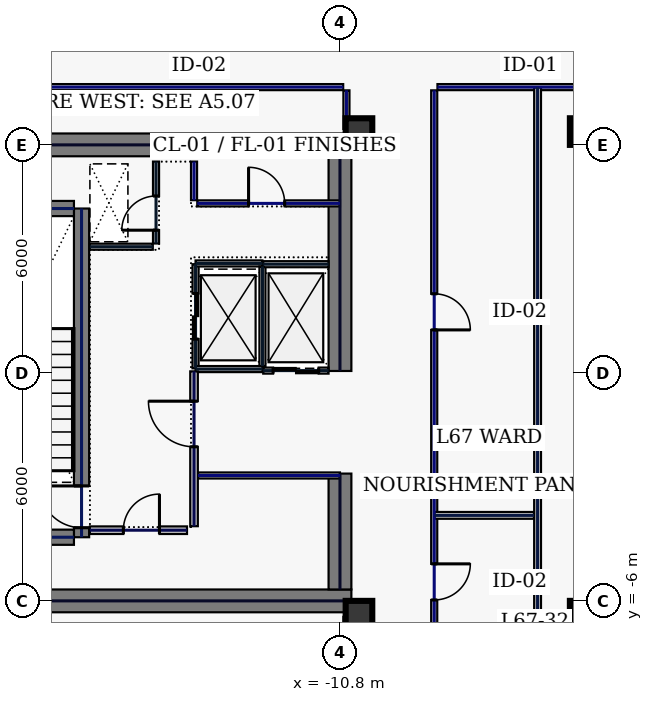
"""IFC4 building model, lengths in metres.
Left out: names, types, materials, properties, quantities, classifications, styles, units other than length and angle.
Written with IfcOpenShell. Run it as: python <this file> out.ifc"""

import sys

from ifc_helpers import new_model, si_unit, direction, frame, frame_2d, origin, origin_2d, place, context, subcontext, project, spatial, rectangle, hollow_rectangle, extrude, element, fill, save


model = new_model("IFC4")
c1 = context("Model", 3, precision=1e-05, world=origin(), true_north=direction((0.0, 1.0)))
c2 = subcontext(c1, "Body", "Model", "MODEL_VIEW")
j1 = project(units=[si_unit("LENGTHUNIT", "METRE"), si_unit("PLANEANGLEUNIT", "RADIAN")], contexts=[c1])
p1 = place(None, origin())
s1 = spatial("IfcSite", under=j1, at=p1, CompositionType="ELEMENT")
p2 = place(p1, origin())
s2 = spatial("IfcBuilding", under=s1, at=p2, CompositionType="ELEMENT")
p3 = place(p2, frame((0.0, 0.0, 289.0)))
s3 = spatial("IfcBuildingStorey", under=s2, at=p3, CompositionType="ELEMENT", Elevation=289.0)
for number, where, z_axis, x_axis in (
    (1, (-22.0, 6.0, 0.0), (0.0, 0.0, 1.0), (1.0, 0.0, 0.0)),
    (2, (-22.0, -6.0, 0.0), (0.0, 0.0, 1.0), (1.0, 0.0, 0.0)),
):
    element("IfcWall", number, at=place(p3, frame(where, z_axis=z_axis, x_axis=x_axis)), inside=s3, PredefinedType="SHEAR", context=c2, shape_type="SweptSolid", body=[
        extrude(rectangle(XDim=11.5, YDim=0.6, at=frame_2d((5.75, 0.0))), origin(), (0.0, 0.0, 1.0), 3.74),
    ])
p4 = place(p3, frame((-10.8, -5.7, 0.0), z_axis=(0.0, 0.0, 1.0), x_axis=(0.0, 1.0, 0.0)))
e3 = element("IfcWall", 3, at=p4, inside=s3, PredefinedType="SHEAR", context=c2, shape_type="SweptSolid", body=[
    extrude(rectangle(XDim=3.05, YDim=0.6, at=frame_2d((1.525, 0.0))), origin(), (0.0, 0.0, 1.0), 3.74),
])
p5 = place(p3, frame((-10.8, 0.05, 0.0), z_axis=(0.0, 0.0, 1.0), x_axis=(0.0, 1.0, 0.0)))
e4 = element("IfcWall", 4, at=p5, inside=s3, PredefinedType="SHEAR", context=c2, shape_type="SweptSolid", body=[
    extrude(rectangle(XDim=5.65, YDim=0.6, at=frame_2d((2.825, 0.0))), origin(), (0.0, 0.0, 1.0), 3.74),
])
p6 = place(p3, frame((-17.6, -4.325, 0.0), z_axis=(0.0, 0.0, 1.0), x_axis=(0.0, 1.0, 0.0)))
e5 = element("IfcWall", 5, at=p6, inside=s3, PredefinedType="SHEAR", context=c2, shape_type="SweptSolid", body=[
    extrude(rectangle(XDim=8.65, YDim=0.4, at=frame_2d((4.325, 0.0))), origin(), (0.0, 0.0, 1.0), 3.74),
])
p7 = place(p6, frame((0.25, 0.0, 0.0)))
e6 = element("IfcOpeningElement", 6, at=p7, cuts=e5, PredefinedType="OPENING", context=c2, shape_type="SweptSolid", body=[
    extrude(rectangle(XDim=1.1, YDim=2.2, at=frame_2d((0.55, 1.1))), frame((0.0, 0.21, 0.0), z_axis=(0.0, -1.0, 0.0), x_axis=(1.0, 0.0, 0.0)), (0.0, 0.0, 1.0), 0.42),
])
for number, where, z_axis, x_axis in (
    (7, (-21.2, -4.325, 0.0), (0.0, 0.0, 1.0), (1.0, 0.0, 0.0)),
    (8, (-21.2, 4.325, 0.0), (0.0, 0.0, 1.0), (1.0, 0.0, 0.0)),
):
    element("IfcWall", number, at=place(p3, frame(where, z_axis=z_axis, x_axis=x_axis)), inside=s3, PredefinedType="SHEAR", context=c2, shape_type="SweptSolid", body=[
        extrude(rectangle(XDim=3.4, YDim=0.4, at=frame_2d((1.7, 0.0))), origin(), (0.0, 0.0, 1.0), 3.74),
    ])
for number, where, z_axis, x_axis in (
    (9, (-10.3, -6.35, 0.0), (0.0, 0.0, 1.0), (1.0, 0.0, 0.0)),
    (10, (-10.3, 6.35, 0.0), (0.0, 0.0, 1.0), (1.0, 0.0, 0.0)),
    (11, (-4.4, -6.35, 0.0), (0.0, 0.0, 1.0), (1.0, 0.0, 0.0)),
    (12, (-4.4, 6.35, 0.0), (0.0, 0.0, 1.0), (1.0, 0.0, 0.0)),
):
    element("IfcColumn", number, at=place(p3, frame(where, z_axis=z_axis, x_axis=x_axis)), inside=s3, PredefinedType="COLUMN", context=c2, shape_type="SweptSolid", body=[
        extrude(hollow_rectangle(XDim=0.7, YDim=0.7, WallThickness=0.032, at=origin_2d()), origin(), (0.0, 0.0, 1.0), 3.74),
    ])
p8 = place(p3, frame((-14.6, 0.12, 0.0), z_axis=(0.0, 0.0, 1.0), x_axis=(0.0, 1.0, 0.0)))
e13 = element("IfcWall", 13, at=p8, inside=s3, PredefinedType="PARTITIONING", context=c2, shape_type="SweptSolid", body=[
    extrude(rectangle(XDim=2.74, YDim=0.16, at=frame_2d((1.37, 0.0))), origin(), (0.0, 0.0, 1.0), 3.74),
])
p9 = place(p8, frame((0.77, 0.0, 0.0)))
e14 = element("IfcOpeningElement", 14, at=p9, cuts=e13, PredefinedType="OPENING", context=c2, shape_type="SweptSolid", body=[
    extrude(rectangle(XDim=1.2, YDim=2.2, at=frame_2d((0.6, 1.1))), frame((0.0, 0.09, 0.0), z_axis=(0.0, -1.0, 0.0), x_axis=(1.0, 0.0, 0.0)), (0.0, 0.0, 1.0), 0.18),
])
for number, where, z_axis, x_axis in (
    (15, (-14.6, 0.1, 0.0), (0.0, 0.0, 1.0), (1.0, 0.0, 0.0)),
    (16, (-14.6, 2.88, 0.0), (0.0, 0.0, 1.0), (1.0, 0.0, 0.0)),
):
    element("IfcWall", number, at=place(p3, frame(where, z_axis=z_axis, x_axis=x_axis)), inside=s3, PredefinedType="PARTITIONING", context=c2, shape_type="SweptSolid", body=[
        extrude(rectangle(XDim=1.76, YDim=0.16, at=frame_2d((0.88, 0.0))), origin(), (0.0, 0.0, 1.0), 3.74),
    ])
p10 = place(p3, frame((-12.84, 0.18, 0.0), z_axis=(0.0, 0.0, 1.0), x_axis=(0.0, 1.0, 0.0)))
e17 = element("IfcWall", 17, at=p10, inside=s3, PredefinedType="PARTITIONING", context=c2, shape_type="SweptSolid", body=[
    extrude(rectangle(XDim=2.62, YDim=0.16, at=frame_2d((1.31, 0.0))), origin(), (0.0, 0.0, 1.0), 3.74),
])
p11 = place(p3, frame((-12.82, 0.06, 0.0), z_axis=(0.0, 0.0, 1.0), x_axis=(1.0, 0.0, 0.0)))
e18 = element("IfcWall", 18, at=p11, inside=s3, PredefinedType="PARTITIONING", context=c2, shape_type="SweptSolid", body=[
    extrude(rectangle(XDim=1.72, YDim=0.16, at=frame_2d((0.86, 0.0))), origin(), (0.0, 0.0, 1.0), 3.74),
])
p12 = place(p11, frame((0.26, 0.0, 0.0)))
e19 = element("IfcOpeningElement", 19, at=p12, cuts=e18, PredefinedType="OPENING", context=c2, shape_type="SweptSolid", body=[
    extrude(rectangle(XDim=1.2, YDim=2.2, at=frame_2d((0.6, 1.1))), frame((0.0, 0.09, 0.0), z_axis=(0.0, -1.0, 0.0), x_axis=(1.0, 0.0, 0.0)), (0.0, 0.0, 1.0), 0.18),
])
p13 = place(p3, frame((-12.82, 2.86, 0.0), z_axis=(0.0, 0.0, 1.0), x_axis=(1.0, 0.0, 0.0)))
e20 = element("IfcWall", 20, at=p13, inside=s3, PredefinedType="PARTITIONING", context=c2, shape_type="SweptSolid", body=[
    extrude(rectangle(XDim=1.72, YDim=0.16, at=frame_2d((0.86, 0.0))), origin(), (0.0, 0.0, 1.0), 3.74),
])
p14 = place(p3, frame((-15.64, 3.405, 0.0), z_axis=(0.0, 0.0, 1.0), x_axis=(0.0, 1.0, 0.0)))
e21 = element("IfcWall", 21, at=p14, inside=s3, PredefinedType="PARTITIONING", context=c2, shape_type="SweptSolid", body=[
    extrude(rectangle(XDim=2.155, YDim=0.16, at=frame_2d((1.078, 0.0))), origin(), (0.0, 0.0, 1.0), 3.74),
])
p15 = place(p14, frame((0.35, 0.0, 0.0)))
e22 = element("IfcOpeningElement", 22, at=p15, cuts=e21, PredefinedType="OPENING", context=c2, shape_type="SweptSolid", body=[
    extrude(rectangle(XDim=0.9, YDim=2.2, at=frame_2d((0.45, 1.1))), frame((0.0, 0.09, 0.0), z_axis=(0.0, -1.0, 0.0), x_axis=(1.0, 0.0, 0.0)), (0.0, 0.0, 1.0), 0.18),
])
p16 = place(p3, frame((-17.38, 3.32, 0.0), z_axis=(0.0, 0.0, 1.0), x_axis=(1.0, 0.0, 0.0)))
e23 = element("IfcWall", 23, at=p16, inside=s3, PredefinedType="PARTITIONING", context=c2, shape_type="SweptSolid", body=[
    extrude(rectangle(XDim=1.655, YDim=0.16, at=frame_2d((0.827, 0.0))), origin(), (0.0, 0.0, 1.0), 3.74),
])
p17 = place(p3, frame((-17.38, -4.14, 0.0), z_axis=(0.0, 0.0, 1.0), x_axis=(1.0, 0.0, 0.0)))
e24 = element("IfcWall", 24, at=p17, inside=s3, PredefinedType="SOLIDWALL", context=c2, shape_type="SweptSolid", body=[
    extrude(rectangle(XDim=2.555, YDim=0.2, at=frame_2d((1.277, 0.0))), origin(), (0.0, 0.0, 1.0), 3.74),
])
p18 = place(p17, frame((0.88, 0.0, 0.0)))
e25 = element("IfcOpeningElement", 25, at=p18, cuts=e24, PredefinedType="OPENING", context=c2, shape_type="SweptSolid", body=[
    extrude(rectangle(XDim=0.95, YDim=2.2, at=frame_2d((0.475, 1.1))), frame((0.0, 0.11, 0.0), z_axis=(0.0, -1.0, 0.0), x_axis=(1.0, 0.0, 0.0)), (0.0, 0.0, 1.0), 0.22),
])
p19 = place(p3, frame((-14.535, -2.7, 0.0), z_axis=(0.0, 0.0, 1.0), x_axis=(1.0, 0.0, 0.0)))
e26 = element("IfcWall", 26, at=p19, inside=s3, PredefinedType="PARTITIONING", context=c2, shape_type="SweptSolid", body=[
    extrude(rectangle(XDim=3.735, YDim=0.16, at=frame_2d((1.867, 0.0))), origin(), (0.0, 0.0, 1.0), 3.74),
])
p20 = place(p3, frame((-14.555, 4.46, 0.0), z_axis=(0.0, 0.0, 1.0), x_axis=(1.0, 0.0, 0.0)))
e27 = element("IfcWall", 27, at=p20, inside=s3, PredefinedType="PARTITIONING", context=c2, shape_type="SweptSolid", body=[
    extrude(rectangle(XDim=3.755, YDim=0.16, at=frame_2d((1.877, 0.0))), origin(), (0.0, 0.0, 1.0), 3.74),
])
p21 = place(p20, frame((1.35, 0.0, 0.0)))
e28 = element("IfcOpeningElement", 28, at=p21, cuts=e27, PredefinedType="OPENING", context=c2, shape_type="SweptSolid", body=[
    extrude(rectangle(XDim=0.95, YDim=2.2, at=frame_2d((0.475, 1.1))), frame((0.0, 0.09, 0.0), z_axis=(0.0, -1.0, 0.0), x_axis=(1.0, 0.0, 0.0)), (0.0, 0.0, 1.0), 0.18),
])
p22 = place(p3, frame((-14.64, 4.545, 0.0), z_axis=(0.0, 0.0, 1.0), x_axis=(0.0, 1.0, 0.0)))
e29 = element("IfcWall", 29, at=p22, inside=s3, PredefinedType="PARTITIONING", context=c2, shape_type="SweptSolid", body=[
    extrude(rectangle(XDim=1.015, YDim=0.16, at=frame_2d((0.508, 0.0))), origin(), (0.0, 0.0, 1.0), 3.74),
])
p23 = place(p3, frame((-14.64, -4.035, 0.0), z_axis=(0.0, 0.0, 1.0), x_axis=(0.0, 1.0, 0.0)))
e30 = element("IfcWall", 30, at=p23, inside=s3, PredefinedType="SOLIDWALL", context=c2, shape_type="SweptSolid", body=[
    extrude(rectangle(XDim=4.075, YDim=0.2, at=frame_2d((2.038, 0.0))), origin(), (0.0, 0.0, 1.0), 3.74),
])
p24 = place(p23, frame((2.09, 0.0, 0.0)))
e31 = element("IfcOpeningElement", 31, at=p24, cuts=e30, PredefinedType="OPENING", context=c2, shape_type="SweptSolid", body=[
    extrude(rectangle(XDim=1.2, YDim=2.2, at=frame_2d((0.6, 1.1))), frame((0.0, 0.11, 0.0), z_axis=(0.0, -1.0, 0.0), x_axis=(1.0, 0.0, 0.0)), (0.0, 0.0, 1.0), 0.22),
])
p25 = place(p3, frame((-3.965, 7.52, 0.0), z_axis=(0.0, 0.0, 1.0), x_axis=(-1.0, 0.0, 0.0)))
e32 = element("IfcWall", 32, at=p25, inside=s3, PredefinedType="PARTITIONING", context=c2, shape_type="SweptSolid", body=[
    extrude(rectangle(XDim=4.27, YDim=0.16, at=frame_2d((2.135, 0.0))), origin(), (0.0, 0.0, 1.0), 3.74),
])
p26 = place(p3, frame((-8.32, 7.435, 0.0), z_axis=(0.0, 0.0, 1.0), x_axis=(0.0, -1.0, 0.0)))
e33 = element("IfcWall", 33, at=p26, inside=s3, PredefinedType="PARTITIONING", context=c2, shape_type="SweptSolid", body=[
    extrude(rectangle(XDim=14.82, YDim=0.16, at=frame_2d((7.41, 0.0))), origin(), (0.0, 0.0, 1.0), 3.74),
])
p27 = place(p26, frame((12.461, 0.0, 0.0)))
e34 = element("IfcOpeningElement", 34, at=p27, cuts=e33, PredefinedType="OPENING", context=c2, shape_type="SweptSolid", body=[
    extrude(rectangle(XDim=0.95, YDim=2.2, at=frame_2d((0.475, 1.1))), frame((0.0, 0.09, 0.0), z_axis=(0.0, -1.0, 0.0), x_axis=(1.0, 0.0, 0.0)), (0.0, 0.0, 1.0), 0.18),
])
p28 = place(p26, frame((5.354, 0.0, 0.0)))
e35 = element("IfcOpeningElement", 35, at=p28, cuts=e33, PredefinedType="OPENING", context=c2, shape_type="SweptSolid", body=[
    extrude(rectangle(XDim=0.95, YDim=2.2, at=frame_2d((0.475, 1.1))), frame((0.0, 0.09, 0.0), z_axis=(0.0, -1.0, 0.0), x_axis=(1.0, 0.0, 0.0)), (0.0, 0.0, 1.0), 0.18),
])
p29 = place(p3, frame((-10.63, -7.385, 0.0), z_axis=(0.0, 0.0, 1.0), x_axis=(0.0, 1.0, 0.0)))
e36 = element("IfcWall", 36, at=p29, inside=s3, PredefinedType="PARTITIONING", context=c2, shape_type="SweptSolid", body=[
    extrude(rectangle(XDim=0.965, YDim=0.16, at=frame_2d((0.482, 0.0))), origin(), (0.0, 0.0, 1.0), 3.74),
])
p30 = place(p3, frame((-10.63, 6.42, 0.0), z_axis=(0.0, 0.0, 1.0), x_axis=(0.0, 1.0, 0.0)))
e37 = element("IfcWall", 37, at=p30, inside=s3, PredefinedType="PARTITIONING", context=c2, shape_type="SweptSolid", body=[
    extrude(rectangle(XDim=1.015, YDim=0.16, at=frame_2d((0.508, 0.0))), origin(), (0.0, 0.0, 1.0), 3.74),
])
p31 = place(p3, frame((-10.715, 7.52, 0.0), z_axis=(0.0, 0.0, 1.0), x_axis=(-1.0, 0.0, 0.0)))
e38 = element("IfcWall", 38, at=p31, inside=s3, PredefinedType="PARTITIONING", context=c2, shape_type="SweptSolid", body=[
    extrude(rectangle(XDim=11.2, YDim=0.16, at=frame_2d((5.6, 0.0))), origin(), (0.0, 0.0, 1.0), 3.74),
])
p32 = place(p3, frame((-5.6, -7.465, 0.0), z_axis=(0.0, 0.0, 1.0), x_axis=(0.0, 1.0, 0.0)))
e39 = element("IfcWall", 39, at=p32, inside=s3, PredefinedType="PARTITIONING", context=c2, shape_type="SweptSolid", body=[
    extrude(rectangle(XDim=14.98, YDim=0.18, at=frame_2d((7.49, 0.0))), origin(), (0.0, 0.0, 1.0), 3.74),
])
p33 = place(p3, frame((-8.315, -3.75, 0.0), z_axis=(0.0, 0.0, 1.0), x_axis=(1.0, 0.0, 0.0)))
e40 = element("IfcWall", 40, at=p33, inside=s3, PredefinedType="PARTITIONING", context=c2, shape_type="SweptSolid", body=[
    extrude(rectangle(XDim=2.62, YDim=0.18, at=frame_2d((1.31, 0.0))), origin(), (0.0, 0.0, 1.0), 3.74),
])
p34 = place(p7, origin())
e41 = element("IfcDoor", 41, at=p34, inside=s3, OperationType="SINGLE_SWING_RIGHT", PredefinedType="DOOR", context=c2, shape_type="SweptSolid", body=[
    extrude(rectangle(XDim=1.1, YDim=2.2, at=frame_2d((0.55, 1.1))), frame((0.0, 0.025, 0.0), z_axis=(0.0, -1.0, 0.0), x_axis=(1.0, 0.0, 0.0)), (0.0, 0.0, 1.0), 0.05),
])
fill(e6, e41)
p35 = place(p9, origin())
e42 = element("IfcDoor", 42, at=p35, inside=s3, OperationType="SLIDING_TO_LEFT", PredefinedType="DOOR", context=c2, shape_type="SweptSolid", body=[
    extrude(rectangle(XDim=1.2, YDim=2.2, at=frame_2d((0.6, 1.1))), frame((0.0, 0.025, 0.0), z_axis=(0.0, -1.0, 0.0), x_axis=(1.0, 0.0, 0.0)), (0.0, 0.0, 1.0), 0.05),
])
fill(e14, e42)
p36 = place(p12, origin())
e43 = element("IfcDoor", 43, at=p36, inside=s3, OperationType="SLIDING_TO_LEFT", PredefinedType="DOOR", context=c2, shape_type="SweptSolid", body=[
    extrude(rectangle(XDim=1.2, YDim=2.2, at=frame_2d((0.6, 1.1))), frame((0.0, 0.025, 0.0), z_axis=(0.0, -1.0, 0.0), x_axis=(1.0, 0.0, 0.0)), (0.0, 0.0, 1.0), 0.05),
])
fill(e19, e43)
p37 = place(p15, origin())
e44 = element("IfcDoor", 44, at=p37, inside=s3, OperationType="SINGLE_SWING_LEFT", PredefinedType="DOOR", context=c2, shape_type="SweptSolid", body=[
    extrude(rectangle(XDim=0.9, YDim=2.2, at=frame_2d((0.45, 1.1))), frame((0.0, 0.025, 0.0), z_axis=(0.0, -1.0, 0.0), x_axis=(1.0, 0.0, 0.0)), (0.0, 0.0, 1.0), 0.05),
])
fill(e22, e44)
p38 = place(p18, origin())
e45 = element("IfcDoor", 45, at=p38, inside=s3, OperationType="SINGLE_SWING_RIGHT", PredefinedType="DOOR", context=c2, shape_type="SweptSolid", body=[
    extrude(rectangle(XDim=0.95, YDim=2.2, at=frame_2d((0.475, 1.1))), frame((0.0, 0.025, 0.0), z_axis=(0.0, -1.0, 0.0), x_axis=(1.0, 0.0, 0.0)), (0.0, 0.0, 1.0), 0.05),
])
fill(e25, e45)
p39 = place(p21, origin())
e46 = element("IfcDoor", 46, at=p39, inside=s3, OperationType="SINGLE_SWING_LEFT", PredefinedType="DOOR", context=c2, shape_type="SweptSolid", body=[
    extrude(rectangle(XDim=0.95, YDim=2.2, at=frame_2d((0.475, 1.1))), frame((0.0, 0.025, 0.0), z_axis=(0.0, -1.0, 0.0), x_axis=(1.0, 0.0, 0.0)), (0.0, 0.0, 1.0), 0.05),
])
fill(e28, e46)
p40 = place(p24, origin())
e47 = element("IfcDoor", 47, at=p40, inside=s3, OperationType="SINGLE_SWING_RIGHT", PredefinedType="DOOR", context=c2, shape_type="SweptSolid", body=[
    extrude(rectangle(XDim=1.2, YDim=2.2, at=frame_2d((0.6, 1.1))), frame((0.0, 0.025, 0.0), z_axis=(0.0, -1.0, 0.0), x_axis=(1.0, 0.0, 0.0)), (0.0, 0.0, 1.0), 0.05),
])
fill(e31, e47)
p41 = place(p27, origin())
e48 = element("IfcDoor", 48, at=p41, inside=s3, OperationType="SINGLE_SWING_LEFT", PredefinedType="DOOR", context=c2, shape_type="SweptSolid", body=[
    extrude(rectangle(XDim=0.95, YDim=2.2, at=frame_2d((0.475, 1.1))), frame((0.0, 0.025, 0.0), z_axis=(0.0, -1.0, 0.0), x_axis=(1.0, 0.0, 0.0)), (0.0, 0.0, 1.0), 0.05),
])
fill(e34, e48)
p42 = place(p28, origin())
e49 = element("IfcDoor", 49, at=p42, inside=s3, OperationType="SINGLE_SWING_RIGHT", PredefinedType="DOOR", context=c2, shape_type="SweptSolid", body=[
    extrude(rectangle(XDim=0.95, YDim=2.2, at=frame_2d((0.475, 1.1))), frame((0.0, 0.025, 0.0), z_axis=(0.0, -1.0, 0.0), x_axis=(1.0, 0.0, 0.0)), (0.0, 0.0, 1.0), 0.05),
])
fill(e35, e49)
save(model, sys.argv[1])
